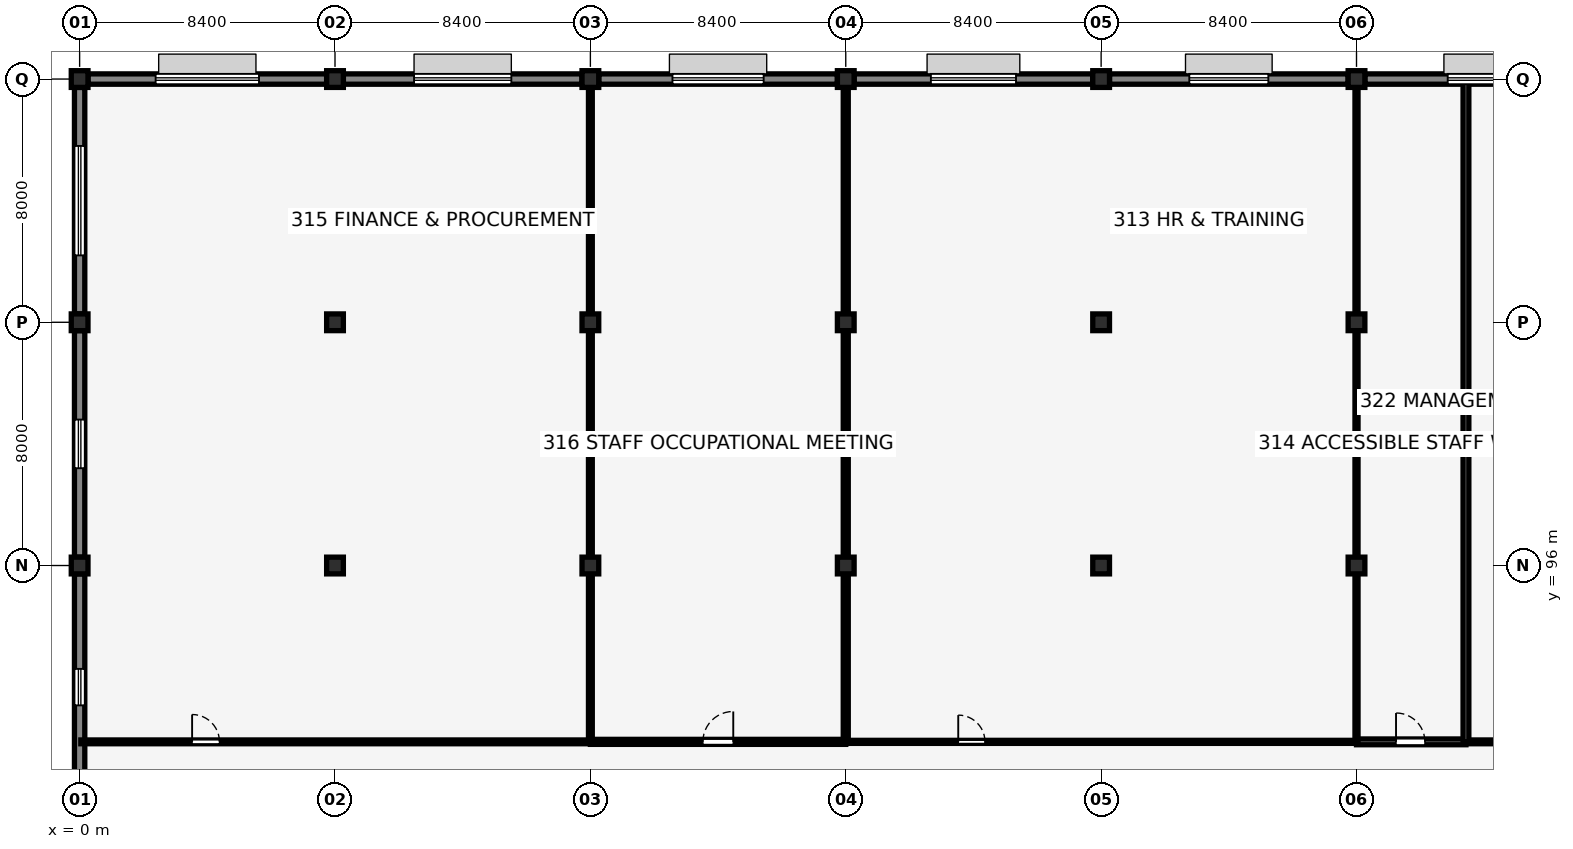
"""IFC4 building model, lengths in metres.
Left out: names, types, materials, properties, quantities, classifications, styles, units other than length and angle.
Written with IfcOpenShell. Run it as: python <this file> out.ifc"""

import sys

from ifc_helpers import new_model, si_unit, direction, frame, frame_2d, origin, origin_2d, place, context, subcontext, project, spatial, rectangle, extrude, element, fill, save


model = new_model("IFC4")
c1 = context("Model", 3, precision=1e-05, world=origin(), true_north=direction((0.0, 1.0)))
c2 = subcontext(c1, "Body", "Model", "MODEL_VIEW")
j1 = project(units=[si_unit("LENGTHUNIT", "METRE"), si_unit("PLANEANGLEUNIT", "RADIAN")], contexts=[c1])
p1 = place(None, origin())
s1 = spatial("IfcSite", under=j1, at=p1, CompositionType="ELEMENT")
p2 = place(p1, origin())
s2 = spatial("IfcBuilding", under=s1, at=p2, CompositionType="ELEMENT")
p3 = place(p2, frame((0.0, 0.0, 13.36)))
s3 = spatial("IfcBuildingStorey", under=s2, at=p3, CompositionType="ELEMENT", Elevation=13.36)
for number, where, z_axis, x_axis in (
    (1, (0.0, 96.0, 0.0), (0.0, 0.0, 1.0), (1.0, 0.0, 0.0)),
    (2, (0.0, 104.0, 0.0), (0.0, 0.0, 1.0), (1.0, 0.0, 0.0)),
    (3, (0.0, 112.0, 0.0), (0.0, 0.0, 1.0), (1.0, 0.0, 0.0)),
    (4, (8.4, 96.0, 0.0), (0.0, 0.0, 1.0), (1.0, 0.0, 0.0)),
    (5, (8.4, 104.0, 0.0), (0.0, 0.0, 1.0), (1.0, 0.0, 0.0)),
    (6, (8.4, 112.0, 0.0), (0.0, 0.0, 1.0), (1.0, 0.0, 0.0)),
    (7, (16.8, 96.0, 0.0), (0.0, 0.0, 1.0), (1.0, 0.0, 0.0)),
    (8, (16.8, 104.0, 0.0), (0.0, 0.0, 1.0), (1.0, 0.0, 0.0)),
    (9, (16.8, 112.0, 0.0), (0.0, 0.0, 1.0), (1.0, 0.0, 0.0)),
    (10, (25.2, 96.0, 0.0), (0.0, 0.0, 1.0), (1.0, 0.0, 0.0)),
    (11, (25.2, 104.0, 0.0), (0.0, 0.0, 1.0), (1.0, 0.0, 0.0)),
    (12, (25.2, 112.0, 0.0), (0.0, 0.0, 1.0), (1.0, 0.0, 0.0)),
    (13, (33.6, 96.0, 0.0), (0.0, 0.0, 1.0), (1.0, 0.0, 0.0)),
    (14, (33.6, 104.0, 0.0), (0.0, 0.0, 1.0), (1.0, 0.0, 0.0)),
    (15, (33.6, 112.0, 0.0), (0.0, 0.0, 1.0), (1.0, 0.0, 0.0)),
    (16, (42.0, 96.0, 0.0), (0.0, 0.0, 1.0), (1.0, 0.0, 0.0)),
    (17, (42.0, 104.0, 0.0), (0.0, 0.0, 1.0), (1.0, 0.0, 0.0)),
    (18, (42.0, 112.0, 0.0), (0.0, 0.0, 1.0), (1.0, 0.0, 0.0)),
):
    element("IfcColumn", number, at=place(p3, frame(where, z_axis=z_axis, x_axis=x_axis)), inside=s3, PredefinedType="COLUMN", context=c2, shape_type="SweptSolid", body=[
        extrude(rectangle(XDim=0.55, YDim=0.55, at=origin_2d()), origin(), (0.0, 0.0, 1.0), 3.58),
    ])
p4 = place(p3, frame((33.875, 112.0, 0.0), z_axis=(0.0, 0.0, 1.0), x_axis=(1.0, 0.0, 0.0)))
e19 = element("IfcWall", 19, at=p4, inside=s3, PredefinedType="SOLIDWALL", context=c2, shape_type="SweptSolid", body=[
    extrude(rectangle(XDim=7.85, YDim=0.34, at=frame_2d((3.925, 0.0))), origin(), (0.0, 0.0, 1.0), 3.28),
])
p5 = place(p4, frame((2.625, 0.0, 0.9), z_axis=(0.0, 0.0, 1.0), x_axis=(1.0, 0.0, 0.0)))
e20 = element("IfcOpeningElement", 20, at=p5, cuts=e19, PredefinedType="OPENING", context=c2, shape_type="SweptSolid", body=[
    extrude(rectangle(XDim=2.6, YDim=1.8, at=frame_2d((1.3, 0.9))), frame((0.0, 0.18, 0.0), z_axis=(0.0, -1.0, 0.0), x_axis=(1.0, 0.0, 0.0)), (0.0, 0.0, 1.0), 0.36),
])
p6 = place(p3, frame((42.275, 112.0, 0.0), z_axis=(0.0, 0.0, 1.0), x_axis=(1.0, 0.0, 0.0)))
e21 = element("IfcWall", 21, at=p6, inside=s3, PredefinedType="SOLIDWALL", context=c2, shape_type="SweptSolid", body=[
    extrude(rectangle(XDim=7.85, YDim=0.34, at=frame_2d((3.925, 0.0))), origin(), (0.0, 0.0, 1.0), 3.28),
])
p7 = place(p6, frame((2.725, 0.0, 0.9), z_axis=(0.0, 0.0, 1.0), x_axis=(1.0, 0.0, 0.0)))
e22 = element("IfcOpeningElement", 22, at=p7, cuts=e21, PredefinedType="OPENING", context=c2, shape_type="SweptSolid", body=[
    extrude(rectangle(XDim=2.4, YDim=1.75, at=frame_2d((1.2, 0.875))), frame((0.0, 0.18, 0.0), z_axis=(0.0, -1.0, 0.0), x_axis=(1.0, 0.0, 0.0)), (0.0, 0.0, 1.0), 0.36),
])
p8 = place(p3, frame((0.0, 88.275, 0.0), z_axis=(0.0, 0.0, 1.0), x_axis=(0.0, 1.0, 0.0)))
e23 = element("IfcWall", 23, at=p8, inside=s3, PredefinedType="SOLIDWALL", context=c2, shape_type="SweptSolid", body=[
    extrude(rectangle(XDim=7.45, YDim=0.34, at=frame_2d((3.725, 0.0))), origin(), (0.0, 0.0, 1.0), 3.28),
])
p9 = place(p8, frame((3.125, 0.0, 1.55), z_axis=(0.0, 0.0, 1.0), x_axis=(1.0, 0.0, 0.0)))
e24 = element("IfcOpeningElement", 24, at=p9, cuts=e23, PredefinedType="OPENING", context=c2, shape_type="SweptSolid", body=[
    extrude(rectangle(XDim=1.2, YDim=0.95, at=frame_2d((0.6, 0.475))), frame((0.0, 0.18, 0.0), z_axis=(0.0, -1.0, 0.0), x_axis=(1.0, 0.0, 0.0)), (0.0, 0.0, 1.0), 0.36),
])
p10 = place(p3, frame((0.0, 96.275, 0.0), z_axis=(0.0, 0.0, 1.0), x_axis=(0.0, 1.0, 0.0)))
e25 = element("IfcWall", 25, at=p10, inside=s3, PredefinedType="SOLIDWALL", context=c2, shape_type="SweptSolid", body=[
    extrude(rectangle(XDim=7.45, YDim=0.34, at=frame_2d((3.725, 0.0))), origin(), (0.0, 0.0, 1.0), 3.28),
])
p11 = place(p10, frame((2.925, 0.0, 0.9), z_axis=(0.0, 0.0, 1.0), x_axis=(1.0, 0.0, 0.0)))
e26 = element("IfcOpeningElement", 26, at=p11, cuts=e25, PredefinedType="OPENING", context=c2, shape_type="SweptSolid", body=[
    extrude(rectangle(XDim=1.6, YDim=1.2, at=frame_2d((0.8, 0.6))), frame((0.0, 0.18, 0.0), z_axis=(0.0, -1.0, 0.0), x_axis=(1.0, 0.0, 0.0)), (0.0, 0.0, 1.0), 0.36),
])
p12 = place(p3, frame((0.0, 104.275, 0.0), z_axis=(0.0, 0.0, 1.0), x_axis=(0.0, 1.0, 0.0)))
e27 = element("IfcWall", 27, at=p12, inside=s3, PredefinedType="SOLIDWALL", context=c2, shape_type="SweptSolid", body=[
    extrude(rectangle(XDim=7.45, YDim=0.34, at=frame_2d((3.725, 0.0))), origin(), (0.0, 0.0, 1.0), 3.28),
])
p13 = place(p12, frame((1.925, 0.0, 0.9), z_axis=(0.0, 0.0, 1.0), x_axis=(1.0, 0.0, 0.0)))
e28 = element("IfcOpeningElement", 28, at=p13, cuts=e27, PredefinedType="OPENING", context=c2, shape_type="SweptSolid", body=[
    extrude(rectangle(XDim=3.6, YDim=1.8, at=frame_2d((1.8, 0.9))), frame((0.0, 0.18, 0.0), z_axis=(0.0, -1.0, 0.0), x_axis=(1.0, 0.0, 0.0)), (0.0, 0.0, 1.0), 0.36),
])
p14 = place(p3, frame((0.275, 112.0, 0.0), z_axis=(0.0, 0.0, 1.0), x_axis=(1.0, 0.0, 0.0)))
e29 = element("IfcWall", 29, at=p14, inside=s3, PredefinedType="SOLIDWALL", context=c2, shape_type="SweptSolid", body=[
    extrude(rectangle(XDim=7.85, YDim=0.34, at=frame_2d((3.925, 0.0))), origin(), (0.0, 0.0, 1.0), 3.28),
])
p15 = place(p14, frame((2.225, 0.0, 0.9), z_axis=(0.0, 0.0, 1.0), x_axis=(1.0, 0.0, 0.0)))
e30 = element("IfcOpeningElement", 30, at=p15, cuts=e29, PredefinedType="OPENING", context=c2, shape_type="SweptSolid", body=[
    extrude(rectangle(XDim=3.4, YDim=1.7, at=frame_2d((1.7, 0.85))), frame((0.0, 0.18, 0.0), z_axis=(0.0, -1.0, 0.0), x_axis=(1.0, 0.0, 0.0)), (0.0, 0.0, 1.0), 0.36),
])
p16 = place(p3, frame((8.675, 112.0, 0.0), z_axis=(0.0, 0.0, 1.0), x_axis=(1.0, 0.0, 0.0)))
e31 = element("IfcWall", 31, at=p16, inside=s3, PredefinedType="SOLIDWALL", context=c2, shape_type="SweptSolid", body=[
    extrude(rectangle(XDim=7.85, YDim=0.34, at=frame_2d((3.925, 0.0))), origin(), (0.0, 0.0, 1.0), 3.28),
])
p17 = place(p16, frame((2.325, 0.0, 0.9), z_axis=(0.0, 0.0, 1.0), x_axis=(1.0, 0.0, 0.0)))
e32 = element("IfcOpeningElement", 32, at=p17, cuts=e31, PredefinedType="OPENING", context=c2, shape_type="SweptSolid", body=[
    extrude(rectangle(XDim=3.2, YDim=1.65, at=frame_2d((1.6, 0.825))), frame((0.0, 0.18, 0.0), z_axis=(0.0, -1.0, 0.0), x_axis=(1.0, 0.0, 0.0)), (0.0, 0.0, 1.0), 0.36),
])
p18 = place(p3, frame((17.075, 112.0, 0.0), z_axis=(0.0, 0.0, 1.0), x_axis=(1.0, 0.0, 0.0)))
e33 = element("IfcWall", 33, at=p18, inside=s3, PredefinedType="SOLIDWALL", context=c2, shape_type="SweptSolid", body=[
    extrude(rectangle(XDim=7.85, YDim=0.34, at=frame_2d((3.925, 0.0))), origin(), (0.0, 0.0, 1.0), 3.28),
])
p19 = place(p18, frame((2.425, 0.0, 0.9), z_axis=(0.0, 0.0, 1.0), x_axis=(1.0, 0.0, 0.0)))
e34 = element("IfcOpeningElement", 34, at=p19, cuts=e33, PredefinedType="OPENING", context=c2, shape_type="SweptSolid", body=[
    extrude(rectangle(XDim=3.0, YDim=1.65, at=frame_2d((1.5, 0.825))), frame((0.0, 0.18, 0.0), z_axis=(0.0, -1.0, 0.0), x_axis=(1.0, 0.0, 0.0)), (0.0, 0.0, 1.0), 0.36),
])
p20 = place(p3, frame((25.475, 112.0, 0.0), z_axis=(0.0, 0.0, 1.0), x_axis=(1.0, 0.0, 0.0)))
e35 = element("IfcWall", 35, at=p20, inside=s3, PredefinedType="SOLIDWALL", context=c2, shape_type="SweptSolid", body=[
    extrude(rectangle(XDim=7.85, YDim=0.34, at=frame_2d((3.925, 0.0))), origin(), (0.0, 0.0, 1.0), 3.28),
])
p21 = place(p20, frame((2.525, 0.0, 0.9), z_axis=(0.0, 0.0, 1.0), x_axis=(1.0, 0.0, 0.0)))
e36 = element("IfcOpeningElement", 36, at=p21, cuts=e35, PredefinedType="OPENING", context=c2, shape_type="SweptSolid", body=[
    extrude(rectangle(XDim=2.8, YDim=1.6, at=frame_2d((1.4, 0.8))), frame((0.0, 0.18, 0.0), z_axis=(0.0, -1.0, 0.0), x_axis=(1.0, 0.0, 0.0)), (0.0, 0.0, 1.0), 0.36),
])
p22 = place(p3, frame((0.04, 90.2, 0.0), z_axis=(0.0, 0.0, 1.0), x_axis=(1.0, 0.0, 0.0)))
e37 = element("IfcWall", 37, at=p22, inside=s3, PredefinedType="PARTITIONING", context=c2, shape_type="SweptSolid", body=[
    extrude(rectangle(XDim=16.76, YDim=0.125, at=frame_2d((8.38, 0.0))), origin(), (0.0, 0.0, 1.0), 3.126),
])
p23 = place(p22, frame((3.66, 0.0, 0.0), z_axis=(0.0, 0.0, 1.0), x_axis=(1.0, 0.0, 0.0)))
e38 = element("IfcOpeningElement", 38, at=p23, cuts=e37, PredefinedType="OPENING", context=c2, shape_type="SweptSolid", body=[
    extrude(rectangle(XDim=0.9, YDim=2.1, at=frame_2d((0.45, 1.05))), frame((0.0, 0.073, 0.0), z_axis=(0.0, -1.0, 0.0), x_axis=(1.0, 0.0, 0.0)), (0.0, 0.0, 1.0), 0.145),
])
p24 = place(p3, frame((16.8, 90.2, 0.0), z_axis=(0.0, 0.0, 1.0), x_axis=(1.0, 0.0, 0.0)))
e39 = element("IfcWall", 39, at=p24, inside=s3, PredefinedType="PARTITIONING", context=c2, shape_type="SweptSolid", body=[
    extrude(rectangle(XDim=8.4, YDim=0.165, at=frame_2d((4.2, 0.0))), origin(), (0.0, 0.0, 1.0), 3.58),
])
p25 = place(p24, frame((3.7, 0.0, 0.0), z_axis=(0.0, 0.0, 1.0), x_axis=(1.0, 0.0, 0.0)))
e40 = element("IfcOpeningElement", 40, at=p25, cuts=e39, PredefinedType="OPENING", context=c2, shape_type="SweptSolid", body=[
    extrude(rectangle(XDim=1.0, YDim=2.15, at=frame_2d((0.5, 1.075))), frame((0.0, 0.093, 0.0), z_axis=(0.0, -1.0, 0.0), x_axis=(1.0, 0.0, 0.0)), (0.0, 0.0, 1.0), 0.185),
])
p26 = place(p3, frame((25.2, 90.2, 0.0), z_axis=(0.0, 0.0, 1.0), x_axis=(1.0, 0.0, 0.0)))
e41 = element("IfcWall", 41, at=p26, inside=s3, PredefinedType="PARTITIONING", context=c2, shape_type="SweptSolid", body=[
    extrude(rectangle(XDim=16.8, YDim=0.1, at=frame_2d((8.4, 0.0))), origin(), (0.0, 0.0, 1.0), 3.58),
])
p27 = place(p26, frame((3.7, 0.0, 0.0), z_axis=(0.0, 0.0, 1.0), x_axis=(1.0, 0.0, 0.0)))
e42 = element("IfcOpeningElement", 42, at=p27, cuts=e41, PredefinedType="OPENING", context=c2, shape_type="SweptSolid", body=[
    extrude(rectangle(XDim=0.88, YDim=2.1, at=frame_2d((0.44, 1.05))), frame((0.0, 0.06, 0.0), z_axis=(0.0, -1.0, 0.0), x_axis=(1.0, 0.0, 0.0)), (0.0, 0.0, 1.0), 0.12),
])
p28 = place(p3, frame((42.0, 90.2, 0.0), z_axis=(0.0, 0.0, 1.0), x_axis=(1.0, 0.0, 0.0)))
e43 = element("IfcWall", 43, at=p28, inside=s3, PredefinedType="PLUMBINGWALL", context=c2, shape_type="SweptSolid", body=[
    extrude(rectangle(XDim=3.6, YDim=0.19, at=frame_2d((1.8, 0.0))), origin(), (0.0, 0.0, 1.0), 3.58),
])
p29 = place(p28, frame((1.3, 0.0, 0.0), z_axis=(0.0, 0.0, 1.0), x_axis=(1.0, 0.0, 0.0)))
e44 = element("IfcOpeningElement", 44, at=p29, cuts=e43, PredefinedType="OPENING", context=c2, shape_type="SweptSolid", body=[
    extrude(rectangle(XDim=0.95, YDim=2.15, at=frame_2d((0.475, 1.075))), frame((0.0, 0.105, 0.0), z_axis=(0.0, -1.0, 0.0), x_axis=(1.0, 0.0, 0.0)), (0.0, 0.0, 1.0), 0.21),
])
p30 = place(p3, frame((45.6, 90.2, 0.0), z_axis=(0.0, 0.0, 1.0), x_axis=(1.0, 0.0, 0.0)))
e45 = element("IfcWall", 45, at=p30, inside=s3, PredefinedType="PARTITIONING", context=c2, shape_type="SweptSolid", body=[
    extrude(rectangle(XDim=4.76, YDim=0.125, at=frame_2d((2.38, 0.0))), origin(), (0.0, 0.0, 1.0), 3.58),
])
p31 = place(p30, frame((1.88, 0.0, 0.0), z_axis=(0.0, 0.0, 1.0), x_axis=(1.0, 0.0, 0.0)))
e46 = element("IfcOpeningElement", 46, at=p31, cuts=e45, PredefinedType="OPENING", context=c2, shape_type="SweptSolid", body=[
    extrude(rectangle(XDim=0.95, YDim=2.15, at=frame_2d((0.475, 1.075))), frame((0.0, 0.073, 0.0), z_axis=(0.0, -1.0, 0.0), x_axis=(1.0, 0.0, 0.0)), (0.0, 0.0, 1.0), 0.145),
])
p32 = place(p3, frame((16.8, 90.2, 0.0), z_axis=(0.0, 0.0, 1.0), x_axis=(0.0, 1.0, 0.0)))
e47 = element("IfcWall", 47, at=p32, inside=s3, PredefinedType="PARTITIONING", context=c2, shape_type="SweptSolid", body=[
    extrude(rectangle(XDim=5.535, YDim=0.125, at=frame_2d((2.768, 0.0))), origin(), (0.0, 0.0, 1.0), 3.126),
])
for number, where, z_axis, x_axis in (
    (48, (16.8, 96.265, 0.0), (0.0, 0.0, 1.0), (0.0, 1.0, 0.0)),
    (49, (16.8, 104.265, 0.0), (0.0, 0.0, 1.0), (0.0, 1.0, 0.0)),
):
    element("IfcWall", number, at=place(p3, frame(where, z_axis=z_axis, x_axis=x_axis)), inside=s3, PredefinedType="PARTITIONING", context=c2, shape_type="SweptSolid", body=[
        extrude(rectangle(XDim=7.47, YDim=0.125, at=frame_2d((3.735, 0.0))), origin(), (0.0, 0.0, 1.0), 3.126),
    ])
p33 = place(p3, frame((25.2, 90.2, 0.0), z_axis=(0.0, 0.0, 1.0), x_axis=(0.0, 1.0, 0.0)))
e50 = element("IfcWall", 50, at=p33, inside=s3, PredefinedType="PARTITIONING", context=c2, shape_type="SweptSolid", body=[
    extrude(rectangle(XDim=5.535, YDim=0.165, at=frame_2d((2.768, 0.0))), origin(), (0.0, 0.0, 1.0), 3.126),
])
for number, where, z_axis, x_axis in (
    (51, (25.2, 96.265, 0.0), (0.0, 0.0, 1.0), (0.0, 1.0, 0.0)),
    (52, (25.2, 104.265, 0.0), (0.0, 0.0, 1.0), (0.0, 1.0, 0.0)),
):
    element("IfcWall", number, at=place(p3, frame(where, z_axis=z_axis, x_axis=x_axis)), inside=s3, PredefinedType="PARTITIONING", context=c2, shape_type="SweptSolid", body=[
        extrude(rectangle(XDim=7.47, YDim=0.165, at=frame_2d((3.735, 0.0))), origin(), (0.0, 0.0, 1.0), 3.126),
    ])
p34 = place(p3, frame((42.0, 90.2, 0.0), z_axis=(0.0, 0.0, 1.0), x_axis=(0.0, 1.0, 0.0)))
e53 = element("IfcWall", 53, at=p34, inside=s3, PredefinedType="PARTITIONING", context=c2, shape_type="SweptSolid", body=[
    extrude(rectangle(XDim=5.535, YDim=0.1, at=frame_2d((2.768, 0.0))), origin(), (0.0, 0.0, 1.0), 3.126),
])
for number, where, z_axis, x_axis in (
    (54, (42.0, 96.265, 0.0), (0.0, 0.0, 1.0), (0.0, 1.0, 0.0)),
    (55, (42.0, 104.265, 0.0), (0.0, 0.0, 1.0), (0.0, 1.0, 0.0)),
):
    element("IfcWall", number, at=place(p3, frame(where, z_axis=z_axis, x_axis=x_axis)), inside=s3, PredefinedType="PARTITIONING", context=c2, shape_type="SweptSolid", body=[
        extrude(rectangle(XDim=7.47, YDim=0.1, at=frame_2d((3.735, 0.0))), origin(), (0.0, 0.0, 1.0), 3.126),
    ])
p35 = place(p3, frame((45.6, 90.2, 0.0), z_axis=(0.0, 0.0, 1.0), x_axis=(0.0, 1.0, 0.0)))
e56 = element("IfcWall", 56, at=p35, inside=s3, PredefinedType="PLUMBINGWALL", context=c2, shape_type="SweptSolid", body=[
    extrude(rectangle(XDim=21.76, YDim=0.19, at=frame_2d((10.88, 0.0))), origin(), (0.0, 0.0, 1.0), 3.58),
])
p36 = place(p5, origin())
e57 = element("IfcWindow", 57, at=p36, inside=s3, PartitioningType="DOUBLE_PANEL_VERTICAL", PredefinedType="WINDOW", context=c2, shape_type="SweptSolid", body=[
    extrude(rectangle(XDim=2.6, YDim=1.8, at=frame_2d((1.3, 0.9))), frame((0.0, 0.03, 0.0), z_axis=(0.0, -1.0, 0.0), x_axis=(1.0, 0.0, 0.0)), (0.0, 0.0, 1.0), 0.06),
])
fill(e20, e57)
p37 = place(p7, origin())
e58 = element("IfcWindow", 58, at=p37, inside=s3, PartitioningType="DOUBLE_PANEL_VERTICAL", PredefinedType="WINDOW", context=c2, shape_type="SweptSolid", body=[
    extrude(rectangle(XDim=2.4, YDim=1.75, at=frame_2d((1.2, 0.875))), frame((0.0, 0.03, 0.0), z_axis=(0.0, -1.0, 0.0), x_axis=(1.0, 0.0, 0.0)), (0.0, 0.0, 1.0), 0.06),
])
fill(e22, e58)
p38 = place(p9, origin())
e59 = element("IfcWindow", 59, at=p38, inside=s3, PartitioningType="SINGLE_PANEL", PredefinedType="WINDOW", context=c2, shape_type="SweptSolid", body=[
    extrude(rectangle(XDim=1.2, YDim=0.95, at=frame_2d((0.6, 0.475))), frame((0.0, 0.03, 0.0), z_axis=(0.0, -1.0, 0.0), x_axis=(1.0, 0.0, 0.0)), (0.0, 0.0, 1.0), 0.06),
])
fill(e24, e59)
p39 = place(p11, origin())
e60 = element("IfcWindow", 60, at=p39, inside=s3, PartitioningType="DOUBLE_PANEL_VERTICAL", PredefinedType="WINDOW", context=c2, shape_type="SweptSolid", body=[
    extrude(rectangle(XDim=1.6, YDim=1.2, at=frame_2d((0.8, 0.6))), frame((0.0, 0.03, 0.0), z_axis=(0.0, -1.0, 0.0), x_axis=(1.0, 0.0, 0.0)), (0.0, 0.0, 1.0), 0.06),
])
fill(e26, e60)
p40 = place(p13, origin())
e61 = element("IfcWindow", 61, at=p40, inside=s3, PartitioningType="TRIPLE_PANEL_VERTICAL", PredefinedType="WINDOW", context=c2, shape_type="SweptSolid", body=[
    extrude(rectangle(XDim=3.6, YDim=1.8, at=frame_2d((1.8, 0.9))), frame((0.0, 0.03, 0.0), z_axis=(0.0, -1.0, 0.0), x_axis=(1.0, 0.0, 0.0)), (0.0, 0.0, 1.0), 0.06),
])
fill(e28, e61)
p41 = place(p15, origin())
e62 = element("IfcWindow", 62, at=p41, inside=s3, PartitioningType="TRIPLE_PANEL_VERTICAL", PredefinedType="WINDOW", context=c2, shape_type="SweptSolid", body=[
    extrude(rectangle(XDim=3.4, YDim=1.7, at=frame_2d((1.7, 0.85))), frame((0.0, 0.03, 0.0), z_axis=(0.0, -1.0, 0.0), x_axis=(1.0, 0.0, 0.0)), (0.0, 0.0, 1.0), 0.06),
])
fill(e30, e62)
p42 = place(p17, origin())
e63 = element("IfcWindow", 63, at=p42, inside=s3, PartitioningType="TRIPLE_PANEL_VERTICAL", PredefinedType="WINDOW", context=c2, shape_type="SweptSolid", body=[
    extrude(rectangle(XDim=3.2, YDim=1.65, at=frame_2d((1.6, 0.825))), frame((0.0, 0.03, 0.0), z_axis=(0.0, -1.0, 0.0), x_axis=(1.0, 0.0, 0.0)), (0.0, 0.0, 1.0), 0.06),
])
fill(e32, e63)
p43 = place(p19, origin())
e64 = element("IfcWindow", 64, at=p43, inside=s3, PartitioningType="DOUBLE_PANEL_VERTICAL", PredefinedType="WINDOW", context=c2, shape_type="SweptSolid", body=[
    extrude(rectangle(XDim=3.0, YDim=1.65, at=frame_2d((1.5, 0.825))), frame((0.0, 0.03, 0.0), z_axis=(0.0, -1.0, 0.0), x_axis=(1.0, 0.0, 0.0)), (0.0, 0.0, 1.0), 0.06),
])
fill(e34, e64)
p44 = place(p21, origin())
e65 = element("IfcWindow", 65, at=p44, inside=s3, PartitioningType="DOUBLE_PANEL_VERTICAL", PredefinedType="WINDOW", context=c2, shape_type="SweptSolid", body=[
    extrude(rectangle(XDim=2.8, YDim=1.6, at=frame_2d((1.4, 0.8))), frame((0.0, 0.03, 0.0), z_axis=(0.0, -1.0, 0.0), x_axis=(1.0, 0.0, 0.0)), (0.0, 0.0, 1.0), 0.06),
])
fill(e36, e65)
p45 = place(p23, origin())
e66 = element("IfcDoor", 66, at=p45, inside=s3, OperationType="SINGLE_SWING_LEFT", PredefinedType="DOOR", context=c2, shape_type="SweptSolid", body=[
    extrude(rectangle(XDim=0.9, YDim=2.1, at=frame_2d((0.45, 1.05))), frame((0.0, 0.025, 0.0), z_axis=(0.0, -1.0, 0.0), x_axis=(1.0, 0.0, 0.0)), (0.0, 0.0, 1.0), 0.05),
])
fill(e38, e66)
p46 = place(p25, origin())
e67 = element("IfcDoor", 67, at=p46, inside=s3, OperationType="SINGLE_SWING_RIGHT", PredefinedType="DOOR", context=c2, shape_type="SweptSolid", body=[
    extrude(rectangle(XDim=1.0, YDim=2.15, at=frame_2d((0.5, 1.075))), frame((0.0, 0.025, 0.0), z_axis=(0.0, -1.0, 0.0), x_axis=(1.0, 0.0, 0.0)), (0.0, 0.0, 1.0), 0.05),
])
fill(e40, e67)
p47 = place(p27, origin())
e68 = element("IfcDoor", 68, at=p47, inside=s3, OperationType="SINGLE_SWING_LEFT", PredefinedType="DOOR", context=c2, shape_type="SweptSolid", body=[
    extrude(rectangle(XDim=0.88, YDim=2.1, at=frame_2d((0.44, 1.05))), frame((0.0, 0.025, 0.0), z_axis=(0.0, -1.0, 0.0), x_axis=(1.0, 0.0, 0.0)), (0.0, 0.0, 1.0), 0.05),
])
fill(e42, e68)
p48 = place(p29, origin())
e69 = element("IfcDoor", 69, at=p48, inside=s3, OperationType="SINGLE_SWING_LEFT", PredefinedType="DOOR", context=c2, shape_type="SweptSolid", body=[
    extrude(rectangle(XDim=0.95, YDim=2.15, at=frame_2d((0.475, 1.075))), frame((0.0, 0.025, 0.0), z_axis=(0.0, -1.0, 0.0), x_axis=(1.0, 0.0, 0.0)), (0.0, 0.0, 1.0), 0.05),
])
fill(e44, e69)
save(model, sys.argv[1])
